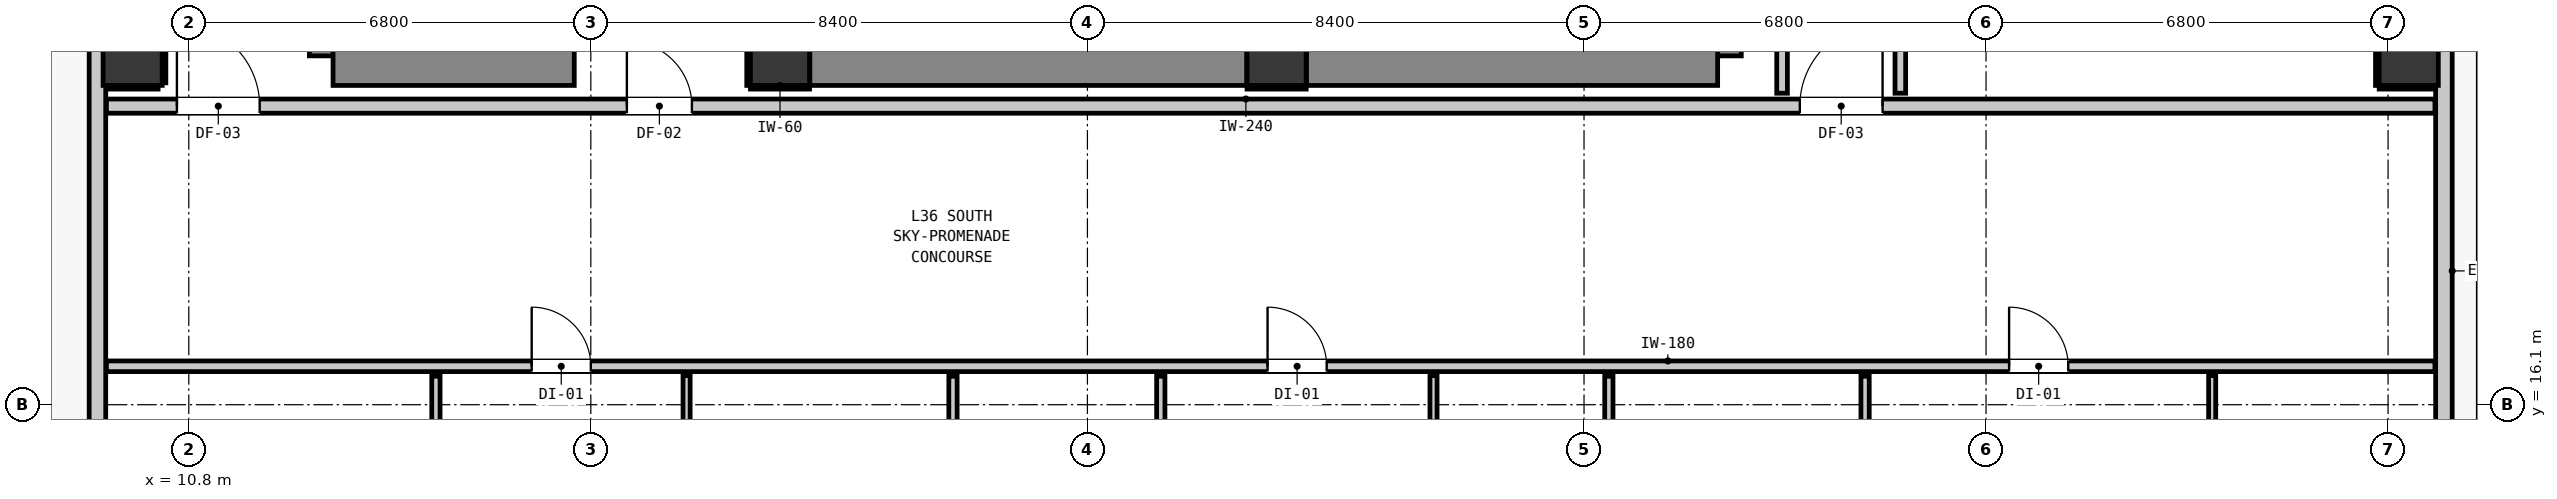
"""IFC4 building model, lengths in metres.
Left out: names, types, materials, properties, quantities, classifications, styles, units other than length and angle.
Written with IfcOpenShell. Run it as: python <this file> out.ifc"""

import sys

from ifc_helpers import new_model, si_unit, direction, frame, frame_2d, origin, origin_2d, place, context, subcontext, project, spatial, rectangle, extrude, element, fill, save


model = new_model("IFC4")
c1 = context("Model", 3, precision=1e-05, world=origin(), true_north=direction((0.0, 1.0)))
c2 = subcontext(c1, "Body", "Model", "MODEL_VIEW")
j1 = project(units=[si_unit("LENGTHUNIT", "METRE"), si_unit("PLANEANGLEUNIT", "RADIAN")], contexts=[c1])
p1 = place(None, origin())
s1 = spatial("IfcSite", under=j1, at=p1, CompositionType="ELEMENT")
p2 = place(p1, origin())
s2 = spatial("IfcBuilding", under=s1, at=p2, CompositionType="ELEMENT")
p3 = place(p2, frame((0.0, 0.0, 126.0)))
s3 = spatial("IfcBuildingStorey", under=s2, at=p3, CompositionType="ELEMENT", Elevation=126.0)
for number, where, z_axis, x_axis in (
    (1, (20.8, 22.0, 0.0), (0.0, 0.0, 1.0), (1.0, 0.0, 0.0)),
    (2, (29.2, 22.0, 0.0), (0.0, 0.0, 1.0), (1.0, 0.0, 0.0)),
):
    element("IfcColumn", number, at=place(p3, frame(where, z_axis=z_axis, x_axis=x_axis)), inside=s3, PredefinedType="COLUMN", context=c2, shape_type="SweptSolid", body=[
        extrude(rectangle(XDim=1.0, YDim=1.0, at=origin_2d()), origin(), (0.0, 0.0, 1.0), 3.32),
    ])
p4 = place(p3, frame((13.34, 22.0, 0.0), z_axis=(0.0, 0.0, 1.0), x_axis=(0.0, 1.0, 0.0)))
e3 = element("IfcWall", 3, at=p4, inside=s3, PredefinedType="SHEAR", context=c2, shape_type="SweptSolid", body=[
    extrude(rectangle(XDim=8.195, YDim=1.0, at=frame_2d((4.098, 0.0))), origin(), (0.0, 0.0, 1.0), 3.32),
])
p5 = place(p3, frame((13.24, 22.0, 0.0), z_axis=(0.0, 0.0, 1.0), x_axis=(1.0, 0.0, 0.0)))
e4 = element("IfcWall", 4, at=p5, inside=s3, PredefinedType="SHEAR", context=c2, shape_type="SweptSolid", body=[
    extrude(rectangle(XDim=4.08, YDim=1.0, at=frame_2d((2.04, 0.0))), origin(), (0.0, 0.0, 1.0), 3.32),
])
p6 = place(p3, frame((36.56, 22.0, 0.0), z_axis=(0.0, 0.0, 1.0), x_axis=(0.0, 1.0, 0.0)))
e5 = element("IfcWall", 5, at=p6, inside=s3, PredefinedType="SHEAR", context=c2, shape_type="SweptSolid", body=[
    extrude(rectangle(XDim=8.195, YDim=1.0, at=frame_2d((4.098, 0.0))), origin(), (0.0, 0.0, 1.0), 3.32),
])
p7 = place(p3, frame((29.705, 22.0, 0.0), z_axis=(0.0, 0.0, 1.0), x_axis=(1.0, 0.0, 0.0)))
e6 = element("IfcWall", 6, at=p7, inside=s3, PredefinedType="SHEAR", context=c2, shape_type="SweptSolid", body=[
    extrude(rectangle(XDim=6.955, YDim=1.0, at=frame_2d((3.478, 0.0))), origin(), (0.0, 0.0, 1.0), 3.32),
])
p8 = place(p3, frame((21.305, 22.0, 0.0), z_axis=(0.0, 0.0, 1.0), x_axis=(1.0, 0.0, 0.0)))
e7 = element("IfcWall", 7, at=p8, inside=s3, PredefinedType="SHEAR", context=c2, shape_type="SweptSolid", body=[
    extrude(rectangle(XDim=7.39, YDim=1.0, at=frame_2d((3.695, 0.0))), origin(), (0.0, 0.0, 1.0), 3.32),
])
for number, where, z_axis, x_axis in (
    (8, (9.85, 22.0, -0.2), (0.0, 0.0, 1.0), (1.0, 0.0, 0.0)),
    (9, (48.35, 22.0, -0.2), (0.0, 0.0, 1.0), (1.0, 0.0, 0.0)),
):
    element("IfcColumn", number, at=place(p3, frame(where, z_axis=z_axis, x_axis=x_axis)), inside=s3, PredefinedType="COLUMN", context=c2, shape_type="SweptSolid", body=[
        extrude(rectangle(XDim=1.0, YDim=1.0, at=origin_2d()), origin(), (0.0, 0.0, 1.0), 3.52),
    ])
p9 = place(p3, frame((9.255, 11.355, 0.0), z_axis=(0.0, 0.0, 1.0), x_axis=(0.0, 1.0, 0.0)))
e10 = element("IfcWall", 10, at=p9, inside=s3, PredefinedType="STANDARD", context=c2, shape_type="SweptSolid", body=[
    extrude(rectangle(XDim=32.29, YDim=0.28, at=frame_2d((16.145, 0.0))), origin(), (0.0, 0.0, 1.0), 3.08),
])
p10 = place(p9, frame((0.503, 0.0, 0.0)))
e11 = element("IfcOpeningElement", 11, at=p10, cuts=e10, PredefinedType="OPENING", context=c2, shape_type="SweptSolid", body=[
    extrude(rectangle(XDim=1.1, YDim=2.15, at=frame_2d((0.55, 1.075))), frame((0.0, 0.15, 0.0), z_axis=(0.0, -1.0, 0.0), x_axis=(1.0, 0.0, 0.0)), (0.0, 0.0, 1.0), 0.3),
])
p11 = place(p3, frame((48.945, 43.645, 0.0), z_axis=(0.0, 0.0, 1.0), x_axis=(0.0, -1.0, 0.0)))
e12 = element("IfcWall", 12, at=p11, inside=s3, PredefinedType="STANDARD", context=c2, shape_type="SweptSolid", body=[
    extrude(rectangle(XDim=32.29, YDim=0.28, at=frame_2d((16.145, 0.0))), origin(), (0.0, 0.0, 1.0), 3.08),
])
p12 = place(p11, frame((6.52, 0.0, 0.0)))
e13 = element("IfcOpeningElement", 13, at=p12, cuts=e12, PredefinedType="OPENING", context=c2, shape_type="SweptSolid", body=[
    extrude(rectangle(XDim=1.0, YDim=2.15, at=frame_2d((0.5, 1.075))), frame((0.0, 0.15, 0.0), z_axis=(0.0, -1.0, 0.0), x_axis=(1.0, 0.0, 0.0)), (0.0, 0.0, 1.0), 0.3),
])
p13 = place(p11, frame((0.318, 0.0, 0.85)))
e14 = element("IfcOpeningElement", 14, at=p13, cuts=e12, PredefinedType="OPENING", context=c2, shape_type="SweptSolid", body=[
    extrude(rectangle(XDim=1.05, YDim=1.65, at=frame_2d((0.525, 0.825))), frame((0.0, 0.15, 0.0), z_axis=(0.0, -1.0, 0.0), x_axis=(1.0, 0.0, 0.0)), (0.0, 0.0, 1.0), 0.3),
])
p14 = place(p11, frame((16.674, 0.0, 0.85)))
e15 = element("IfcOpeningElement", 15, at=p14, cuts=e12, PredefinedType="OPENING", context=c2, shape_type="SweptSolid", body=[
    extrude(rectangle(XDim=1.5, YDim=1.8, at=frame_2d((0.75, 0.9))), frame((0.0, 0.15, 0.0), z_axis=(0.0, -1.0, 0.0), x_axis=(1.0, 0.0, 0.0)), (0.0, 0.0, 1.0), 0.3),
])
p15 = place(p11, frame((13.773, 0.0, 0.85)))
e16 = element("IfcOpeningElement", 16, at=p15, cuts=e12, PredefinedType="OPENING", context=c2, shape_type="SweptSolid", body=[
    extrude(rectangle(XDim=1.05, YDim=1.65, at=frame_2d((0.525, 0.825))), frame((0.0, 0.15, 0.0), z_axis=(0.0, -1.0, 0.0), x_axis=(1.0, 0.0, 0.0)), (0.0, 0.0, 1.0), 0.3),
])
p16 = place(p11, frame((7.907, 0.0, 0.85)))
e17 = element("IfcOpeningElement", 17, at=p16, cuts=e12, PredefinedType="OPENING", context=c2, shape_type="SweptSolid", body=[
    extrude(rectangle(XDim=1.5, YDim=1.8, at=frame_2d((0.75, 0.9))), frame((0.0, 0.15, 0.0), z_axis=(0.0, -1.0, 0.0), x_axis=(1.0, 0.0, 0.0)), (0.0, 0.0, 1.0), 0.3),
])
p17 = place(p11, frame((5.043, 0.0, 0.85)))
e18 = element("IfcOpeningElement", 18, at=p17, cuts=e12, PredefinedType="OPENING", context=c2, shape_type="SweptSolid", body=[
    extrude(rectangle(XDim=0.58, YDim=1.5, at=frame_2d((0.29, 0.75))), frame((0.0, 0.15, 0.0), z_axis=(0.0, -1.0, 0.0), x_axis=(1.0, 0.0, 0.0)), (0.0, 0.0, 1.0), 0.3),
])
p18 = place(p3, frame((9.407, 21.15, 0.0), z_axis=(0.0, 0.0, 1.0), x_axis=(1.0, 0.0, 0.0)))
e19 = element("IfcWall", 19, at=p18, inside=s3, PredefinedType="PARTITIONING", context=c2, shape_type="SweptSolid", body=[
    extrude(rectangle(XDim=39.386, YDim=0.24, at=frame_2d((19.693, 0.0))), origin(), (0.0, 0.0, 1.0), 3.08),
])
p19 = place(p18, frame((8.803, 0.0, 0.0)))
e20 = element("IfcOpeningElement", 20, at=p19, cuts=e19, PredefinedType="OPENING", context=c2, shape_type="SweptSolid", body=[
    extrude(rectangle(XDim=1.1, YDim=2.15, at=frame_2d((0.55, 1.075))), frame((0.0, 0.13, 0.0), z_axis=(0.0, -1.0, 0.0), x_axis=(1.0, 0.0, 0.0)), (0.0, 0.0, 1.0), 0.26),
])
p20 = place(p18, frame((1.192, 0.0, 0.0)))
e21 = element("IfcOpeningElement", 21, at=p20, cuts=e19, PredefinedType="OPENING", context=c2, shape_type="SweptSolid", body=[
    extrude(rectangle(XDim=1.4, YDim=2.15, at=frame_2d((0.7, 1.075))), frame((0.0, 0.13, 0.0), z_axis=(0.0, -1.0, 0.0), x_axis=(1.0, 0.0, 0.0)), (0.0, 0.0, 1.0), 0.26),
])
p21 = place(p18, frame((28.643, 0.0, 0.0)))
e22 = element("IfcOpeningElement", 22, at=p21, cuts=e19, PredefinedType="OPENING", context=c2, shape_type="SweptSolid", body=[
    extrude(rectangle(XDim=1.4, YDim=2.15, at=frame_2d((0.7, 1.075))), frame((0.0, 0.13, 0.0), z_axis=(0.0, -1.0, 0.0), x_axis=(1.0, 0.0, 0.0)), (0.0, 0.0, 1.0), 0.26),
])
p22 = place(p3, frame((9.407, 16.75, 0.0), z_axis=(0.0, 0.0, 1.0), x_axis=(1.0, 0.0, 0.0)))
e23 = element("IfcWall", 23, at=p22, inside=s3, PredefinedType="PARTITIONING", context=c2, shape_type="SweptSolid", body=[
    extrude(rectangle(XDim=39.386, YDim=0.18, at=frame_2d((19.693, 0.0))), origin(), (0.0, 0.0, 1.0), 3.08),
])
p23 = place(p22, frame((7.193, 0.0, 0.0)))
e24 = element("IfcOpeningElement", 24, at=p23, cuts=e23, PredefinedType="OPENING", context=c2, shape_type="SweptSolid", body=[
    extrude(rectangle(XDim=1.0, YDim=2.15, at=frame_2d((0.5, 1.075))), frame((0.0, 0.1, 0.0), z_axis=(0.0, -1.0, 0.0), x_axis=(1.0, 0.0, 0.0)), (0.0, 0.0, 1.0), 0.2),
])
p24 = place(p22, frame((19.64, 0.0, 0.0)))
e25 = element("IfcOpeningElement", 25, at=p24, cuts=e23, PredefinedType="OPENING", context=c2, shape_type="SweptSolid", body=[
    extrude(rectangle(XDim=1.0, YDim=2.15, at=frame_2d((0.5, 1.075))), frame((0.0, 0.1, 0.0), z_axis=(0.0, -1.0, 0.0), x_axis=(1.0, 0.0, 0.0)), (0.0, 0.0, 1.0), 0.2),
])
p25 = place(p22, frame((32.183, 0.0, 0.0)))
e26 = element("IfcOpeningElement", 26, at=p25, cuts=e23, PredefinedType="OPENING", context=c2, shape_type="SweptSolid", body=[
    extrude(rectangle(XDim=1.0, YDim=2.15, at=frame_2d((0.5, 1.075))), frame((0.0, 0.1, 0.0), z_axis=(0.0, -1.0, 0.0), x_axis=(1.0, 0.0, 0.0)), (0.0, 0.0, 1.0), 0.2),
])
p26 = place(p3, frame((37.75, 21.368, 0.0), z_axis=(0.0, 0.0, 1.0), x_axis=(0.0, 1.0, 0.0)))
e27 = element("IfcWall", 27, at=p26, inside=s3, PredefinedType="PARTITIONING", context=c2, shape_type="SweptSolid", body=[
    extrude(rectangle(XDim=18.694, YDim=0.18, at=frame_2d((9.347, 0.0))), origin(), (0.0, 0.0, 1.0), 3.08),
])
p27 = place(p3, frame((39.75, 21.368, 0.0), z_axis=(0.0, 0.0, 1.0), x_axis=(0.0, 1.0, 0.0)))
e28 = element("IfcWall", 28, at=p27, inside=s3, PredefinedType="PARTITIONING", context=c2, shape_type="SweptSolid", body=[
    extrude(rectangle(XDim=2.522, YDim=0.18, at=frame_2d((1.261, 0.0))), origin(), (0.0, 0.0, 1.0), 3.08),
])
p28 = place(p3, frame((14.98, 13.652, 0.0), z_axis=(0.0, 0.0, 1.0), x_axis=(0.0, 1.0, 0.0)))
e29 = element("IfcWall", 29, at=p28, inside=s3, PredefinedType="PARTITIONING", context=c2, shape_type="SweptSolid", body=[
    extrude(rectangle(XDim=2.93, YDim=0.14, at=frame_2d((1.465, 0.0))), origin(), (0.0, 0.0, 1.0), 3.08),
])
p29 = place(p28, frame((1.032, 0.0, 0.0)))
e30 = element("IfcOpeningElement", 30, at=p29, cuts=e29, PredefinedType="OPENING", context=c2, shape_type="SweptSolid", body=[
    extrude(rectangle(XDim=0.86, YDim=2.02, at=frame_2d((0.43, 1.01))), frame((0.0, 0.08, 0.0), z_axis=(0.0, -1.0, 0.0), x_axis=(1.0, 0.0, 0.0)), (0.0, 0.0, 1.0), 0.16),
])
p30 = place(p3, frame((23.726, 9.207, 0.0), z_axis=(0.0, 0.0, 1.0), x_axis=(0.0, 1.0, 0.0)))
e31 = element("IfcWall", 31, at=p30, inside=s3, PredefinedType="PARTITIONING", context=c2, shape_type="SweptSolid", body=[
    extrude(rectangle(XDim=7.375, YDim=0.14, at=frame_2d((3.688, 0.0))), origin(), (0.0, 0.0, 1.0), 3.08),
])
p31 = place(p3, frame((27.241, 13.652, 0.0), z_axis=(0.0, 0.0, 1.0), x_axis=(0.0, 1.0, 0.0)))
e32 = element("IfcWall", 32, at=p31, inside=s3, PredefinedType="PARTITIONING", context=c2, shape_type="SweptSolid", body=[
    extrude(rectangle(XDim=2.93, YDim=0.14, at=frame_2d((1.465, 0.0))), origin(), (0.0, 0.0, 1.0), 3.08),
])
p32 = place(p31, frame((1.032, 0.0, 0.0)))
e33 = element("IfcOpeningElement", 33, at=p32, cuts=e32, PredefinedType="OPENING", context=c2, shape_type="SweptSolid", body=[
    extrude(rectangle(XDim=0.86, YDim=2.02, at=frame_2d((0.43, 1.01))), frame((0.0, 0.08, 0.0), z_axis=(0.0, -1.0, 0.0), x_axis=(1.0, 0.0, 0.0)), (0.0, 0.0, 1.0), 0.16),
])
p33 = place(p3, frame((34.82, 13.652, 0.0), z_axis=(0.0, 0.0, 1.0), x_axis=(0.0, 1.0, 0.0)))
e34 = element("IfcWall", 34, at=p33, inside=s3, PredefinedType="PARTITIONING", context=c2, shape_type="SweptSolid", body=[
    extrude(rectangle(XDim=2.93, YDim=0.14, at=frame_2d((1.465, 0.0))), origin(), (0.0, 0.0, 1.0), 3.08),
])
p34 = place(p3, frame((39.154, 13.652, 0.0), z_axis=(0.0, 0.0, 1.0), x_axis=(0.0, 1.0, 0.0)))
e35 = element("IfcWall", 35, at=p34, inside=s3, PredefinedType="PARTITIONING", context=c2, shape_type="SweptSolid", body=[
    extrude(rectangle(XDim=2.93, YDim=0.14, at=frame_2d((1.465, 0.0))), origin(), (0.0, 0.0, 1.0), 3.08),
])
p35 = place(p34, frame((1.032, 0.0, 0.0)))
e36 = element("IfcOpeningElement", 36, at=p35, cuts=e35, PredefinedType="OPENING", context=c2, shape_type="SweptSolid", body=[
    extrude(rectangle(XDim=0.86, YDim=2.02, at=frame_2d((0.43, 1.01))), frame((0.0, 0.08, 0.0), z_axis=(0.0, -1.0, 0.0), x_axis=(1.0, 0.0, 0.0)), (0.0, 0.0, 1.0), 0.16),
])
p36 = place(p3, frame((19.22, 9.207, 0.0), z_axis=(0.0, 0.0, 1.0), x_axis=(0.0, 1.0, 0.0)))
e37 = element("IfcWall", 37, at=p36, inside=s3, PredefinedType="PARTITIONING", context=c2, shape_type="SweptSolid", body=[
    extrude(rectangle(XDim=7.385, YDim=0.12, at=frame_2d((3.692, 0.0))), origin(), (0.0, 0.0, 1.0), 3.08),
])
p37 = place(p36, frame((3.318, 0.0, 0.0)))
e38 = element("IfcOpeningElement", 38, at=p37, cuts=e37, PredefinedType="OPENING", context=c2, shape_type="SweptSolid", body=[
    extrude(rectangle(XDim=0.9, YDim=2.1, at=frame_2d((0.45, 1.05))), frame((0.0, 0.07, 0.0), z_axis=(0.0, -1.0, 0.0), x_axis=(1.0, 0.0, 0.0)), (0.0, 0.0, 1.0), 0.14),
])
p38 = place(p3, frame((31.854, 9.207, 0.0), z_axis=(0.0, 0.0, 1.0), x_axis=(0.0, 1.0, 0.0)))
e39 = element("IfcWall", 39, at=p38, inside=s3, PredefinedType="PARTITIONING", context=c2, shape_type="SweptSolid", body=[
    extrude(rectangle(XDim=7.385, YDim=0.12, at=frame_2d((3.692, 0.0))), origin(), (0.0, 0.0, 1.0), 3.08),
])
p39 = place(p38, frame((3.318, 0.0, 0.0)))
e40 = element("IfcOpeningElement", 40, at=p39, cuts=e39, PredefinedType="OPENING", context=c2, shape_type="SweptSolid", body=[
    extrude(rectangle(XDim=0.9, YDim=2.1, at=frame_2d((0.45, 1.05))), frame((0.0, 0.07, 0.0), z_axis=(0.0, -1.0, 0.0), x_axis=(1.0, 0.0, 0.0)), (0.0, 0.0, 1.0), 0.14),
])
p40 = place(p3, frame((45.025, 9.207, 0.0), z_axis=(0.0, 0.0, 1.0), x_axis=(0.0, 1.0, 0.0)))
e41 = element("IfcWall", 41, at=p40, inside=s3, PredefinedType="PARTITIONING", context=c2, shape_type="SweptSolid", body=[
    extrude(rectangle(XDim=7.385, YDim=0.12, at=frame_2d((3.692, 0.0))), origin(), (0.0, 0.0, 1.0), 3.08),
])
p41 = place(p40, frame((3.318, 0.0, 0.0)))
e42 = element("IfcOpeningElement", 42, at=p41, cuts=e41, PredefinedType="OPENING", context=c2, shape_type="SweptSolid", body=[
    extrude(rectangle(XDim=0.9, YDim=2.1, at=frame_2d((0.45, 1.05))), frame((0.0, 0.07, 0.0), z_axis=(0.0, -1.0, 0.0), x_axis=(1.0, 0.0, 0.0)), (0.0, 0.0, 1.0), 0.14),
])
for number, where, z_axis, x_axis in (
    (43, (20.3, 21.468, 0.0), (0.0, 0.0, 1.0), (1.0, 0.0, 0.0)),
    (44, (20.268, 21.5, 0.0), (0.0, 0.0, 1.0), (0.0, 1.0, 0.0)),
    (45, (28.7, 21.468, 0.0), (0.0, 0.0, 1.0), (1.0, 0.0, 0.0)),
):
    element("IfcWall", number, at=place(p3, frame(where, z_axis=z_axis, x_axis=x_axis)), inside=s3, PredefinedType="PARTITIONING", context=c2, shape_type="SweptSolid", body=[
        extrude(rectangle(XDim=1.0, YDim=0.06, at=frame_2d((0.5, 0.0))), origin(), (0.0, 0.0, 1.0), 1.45),
    ])
p42 = place(p3, frame((9.41, 21.468, 0.0), z_axis=(0.0, 0.0, 1.0), x_axis=(1.0, 0.0, 0.0)))
e46 = element("IfcWall", 46, at=p42, inside=s3, PredefinedType="PARTITIONING", context=c2, shape_type="SweptSolid", body=[
    extrude(rectangle(XDim=0.871, YDim=0.06, at=frame_2d((0.436, 0.0))), origin(), (0.0, 0.0, 1.0), 1.45),
])
p43 = place(p3, frame((10.382, 21.544, 0.0), z_axis=(0.0, 0.0, 1.0), x_axis=(0.0, 1.0, 0.0)))
e47 = element("IfcWall", 47, at=p43, inside=s3, PredefinedType="PARTITIONING", context=c2, shape_type="SweptSolid", body=[
    extrude(rectangle(XDim=0.956, YDim=0.06, at=frame_2d((0.478, 0.0))), origin(), (0.0, 0.0, 1.0), 1.45),
])
p44 = place(p3, frame((47.85, 21.468, 0.0), z_axis=(0.0, 0.0, 1.0), x_axis=(1.0, 0.0, 0.0)))
e48 = element("IfcWall", 48, at=p44, inside=s3, PredefinedType="PARTITIONING", context=c2, shape_type="SweptSolid", body=[
    extrude(rectangle(XDim=0.94, YDim=0.06, at=frame_2d((0.47, 0.0))), origin(), (0.0, 0.0, 1.0), 1.45),
])
p45 = place(p3, frame((47.818, 21.5, 0.0), z_axis=(0.0, 0.0, 1.0), x_axis=(0.0, 1.0, 0.0)))
e49 = element("IfcWall", 49, at=p45, inside=s3, PredefinedType="PARTITIONING", context=c2, shape_type="SweptSolid", body=[
    extrude(rectangle(XDim=1.0, YDim=0.06, at=frame_2d((0.5, 0.0))), origin(), (0.0, 0.0, 1.0), 1.45),
])
p46 = place(p19, origin())
e50 = element("IfcDoor", 50, at=p46, inside=s3, OperationType="SINGLE_SWING_LEFT", PredefinedType="DOOR", context=c2, shape_type="SweptSolid", body=[
    extrude(rectangle(XDim=1.1, YDim=2.15, at=frame_2d((0.55, 1.075))), frame((0.0, 0.025, 0.0), z_axis=(0.0, -1.0, 0.0), x_axis=(1.0, 0.0, 0.0)), (0.0, 0.0, 1.0), 0.05),
])
fill(e20, e50)
p47 = place(p20, origin())
e51 = element("IfcDoor", 51, at=p47, inside=s3, OperationType="SINGLE_SWING_LEFT", PredefinedType="DOOR", context=c2, shape_type="SweptSolid", body=[
    extrude(rectangle(XDim=1.4, YDim=2.15, at=frame_2d((0.7, 1.075))), frame((0.0, 0.025, 0.0), z_axis=(0.0, -1.0, 0.0), x_axis=(1.0, 0.0, 0.0)), (0.0, 0.0, 1.0), 0.05),
])
fill(e21, e51)
p48 = place(p21, origin())
e52 = element("IfcDoor", 52, at=p48, inside=s3, OperationType="SINGLE_SWING_RIGHT", PredefinedType="DOOR", context=c2, shape_type="SweptSolid", body=[
    extrude(rectangle(XDim=1.4, YDim=2.15, at=frame_2d((0.7, 1.075))), frame((0.0, 0.025, 0.0), z_axis=(0.0, -1.0, 0.0), x_axis=(1.0, 0.0, 0.0)), (0.0, 0.0, 1.0), 0.05),
])
fill(e22, e52)
p49 = place(p23, origin())
e53 = element("IfcDoor", 53, at=p49, inside=s3, OperationType="SINGLE_SWING_LEFT", PredefinedType="DOOR", context=c2, shape_type="SweptSolid", body=[
    extrude(rectangle(XDim=1.0, YDim=2.15, at=frame_2d((0.5, 1.075))), frame((0.0, 0.025, 0.0), z_axis=(0.0, -1.0, 0.0), x_axis=(1.0, 0.0, 0.0)), (0.0, 0.0, 1.0), 0.05),
])
fill(e24, e53)
p50 = place(p24, origin())
e54 = element("IfcDoor", 54, at=p50, inside=s3, OperationType="SINGLE_SWING_LEFT", PredefinedType="DOOR", context=c2, shape_type="SweptSolid", body=[
    extrude(rectangle(XDim=1.0, YDim=2.15, at=frame_2d((0.5, 1.075))), frame((0.0, 0.025, 0.0), z_axis=(0.0, -1.0, 0.0), x_axis=(1.0, 0.0, 0.0)), (0.0, 0.0, 1.0), 0.05),
])
fill(e25, e54)
p51 = place(p25, origin())
e55 = element("IfcDoor", 55, at=p51, inside=s3, OperationType="SINGLE_SWING_LEFT", PredefinedType="DOOR", context=c2, shape_type="SweptSolid", body=[
    extrude(rectangle(XDim=1.0, YDim=2.15, at=frame_2d((0.5, 1.075))), frame((0.0, 0.025, 0.0), z_axis=(0.0, -1.0, 0.0), x_axis=(1.0, 0.0, 0.0)), (0.0, 0.0, 1.0), 0.05),
])
fill(e26, e55)
save(model, sys.argv[1])
